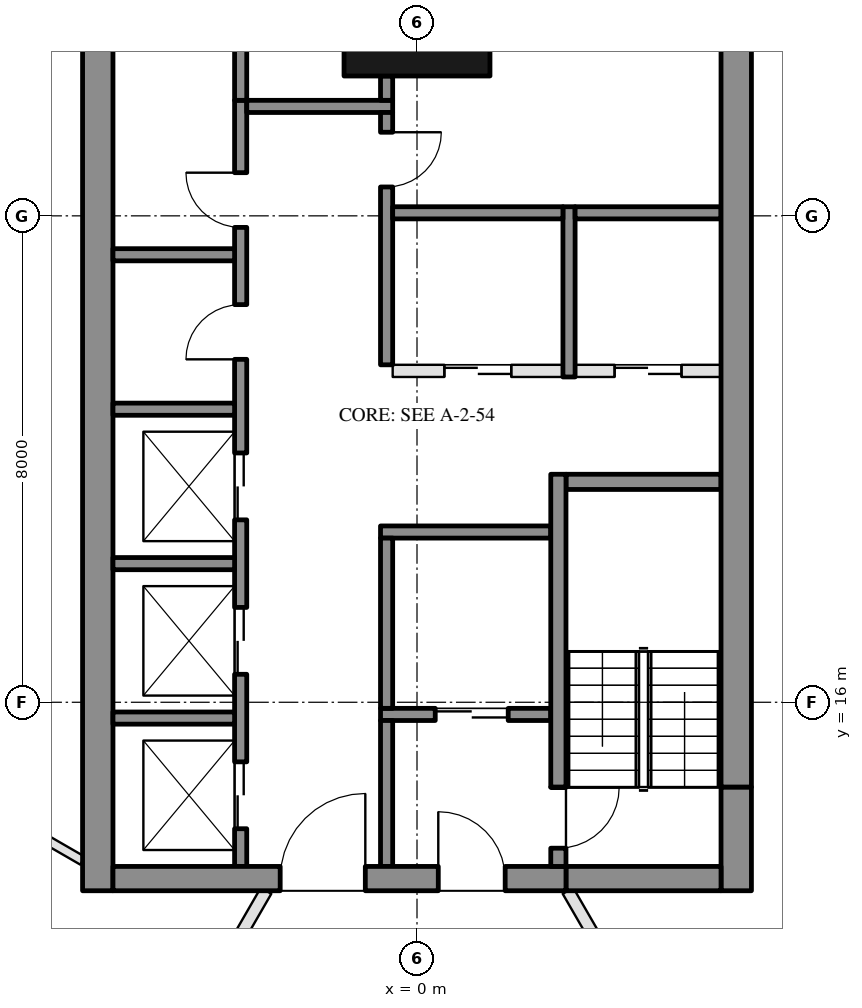
"""IFC4 building model, lengths in metres.
Left out: names, types, materials, properties, quantities, classifications, styles, units other than length and angle.
Written with IfcOpenShell. Run it as: python <this file> out.ifc"""

import sys

from ifc_helpers import new_model, si_unit, direction, frame, frame_2d, origin, origin_2d, place, context, subcontext, project, spatial, rectangle, hollow_rectangle, extrude, element, fill, save


model = new_model("IFC4")
c1 = context("Model", 3, precision=1e-05, world=origin(), true_north=direction((0.0, 1.0)))
c2 = subcontext(c1, "Body", "Model", "MODEL_VIEW")
j1 = project(units=[si_unit("LENGTHUNIT", "METRE"), si_unit("PLANEANGLEUNIT", "RADIAN")], contexts=[c1])
p1 = place(None, origin())
s1 = spatial("IfcSite", under=j1, at=p1, CompositionType="ELEMENT")
p2 = place(p1, origin())
s2 = spatial("IfcBuilding", under=s1, at=p2, CompositionType="ELEMENT")
p3 = place(p2, frame((0.0, 0.0, 231.7)))
s3 = spatial("IfcBuildingStorey", under=s2, at=p3, CompositionType="ELEMENT", Elevation=231.7)
p4 = place(p3, frame((0.0, 27.4, 0.0), z_axis=(0.0, 0.0, 1.0), x_axis=(1.0, 0.0, 0.0)))
e1 = element("IfcColumn", 1, at=p4, inside=s3, PredefinedType="COLUMN", context=c2, shape_type="SweptSolid", body=[
    extrude(hollow_rectangle(XDim=2.4, YDim=2.2, WallThickness=0.06, at=origin_2d()), origin(), (0.0, 0.0, 1.0), 6.0),
])
p5 = place(p3, frame((-5.25, 12.9, 0.0), z_axis=(0.0, 0.0, 1.0), x_axis=(0.0, 1.0, 0.0)))
e2 = element("IfcWall", 2, at=p5, inside=s3, PredefinedType="SHEAR", context=c2, shape_type="SweptSolid", body=[
    extrude(rectangle(XDim=14.837, YDim=0.5, at=frame_2d((7.418, 0.0))), origin(), (0.0, 0.0, 1.0), 5.7),
])
p6 = place(p3, frame((5.0, 19.625, 0.0), z_axis=(0.0, 0.0, 1.0), x_axis=(-1.0, 0.0, 0.0)))
e3 = element("IfcWall", 3, at=p6, inside=s3, PredefinedType="SHEAR", context=c2, shape_type="SweptSolid", body=[
    extrude(rectangle(XDim=2.55, YDim=0.25, at=frame_2d((1.275, 0.0))), origin(), (0.0, 0.0, 1.0), 5.7),
])
p7 = place(p3, frame((2.2, 18.8, 0.0), z_axis=(0.0, 0.0, 1.0), x_axis=(-1.0, 0.0, 0.0)))
e4 = element("IfcWall", 4, at=p7, inside=s3, PredefinedType="SHEAR", context=c2, shape_type="SweptSolid", body=[
    extrude(rectangle(XDim=2.8, YDim=0.2, at=frame_2d((1.4, 0.0))), origin(), (0.0, 0.0, 1.0), 5.7),
])
p8 = place(p3, frame((2.2, 15.8, 0.0), z_axis=(0.0, 0.0, 1.0), x_axis=(-1.0, 0.0, 0.0)))
e5 = element("IfcWall", 5, at=p8, inside=s3, PredefinedType="SHEAR", context=c2, shape_type="SweptSolid", body=[
    extrude(rectangle(XDim=2.8, YDim=0.2, at=frame_2d((1.4, 0.0))), origin(), (0.0, 0.0, 1.0), 5.7),
])
p9 = place(p8, frame((0.7, 0.0, 0.0)))
e6 = element("IfcOpeningElement", 6, at=p9, cuts=e5, PredefinedType="OPENING", context=c2, shape_type="SweptSolid", body=[
    extrude(rectangle(XDim=1.2, YDim=2.1, at=frame_2d((0.6, 1.05))), frame((0.0, 0.11, 0.0), z_axis=(0.0, -1.0, 0.0), x_axis=(1.0, 0.0, 0.0)), (0.0, 0.0, 1.0), 0.22),
])
p10 = place(p3, frame((-0.5, 15.9, 0.0), z_axis=(0.0, 0.0, 1.0), x_axis=(0.0, 1.0, 0.0)))
e7 = element("IfcWall", 7, at=p10, inside=s3, PredefinedType="SHEAR", context=c2, shape_type="SweptSolid", body=[
    extrude(rectangle(XDim=2.8, YDim=0.2, at=frame_2d((1.4, 0.0))), origin(), (0.0, 0.0, 1.0), 5.7),
])
p11 = place(p3, frame((-0.5, 13.3, 0.0), z_axis=(0.0, 0.0, 1.0), x_axis=(0.0, 1.0, 0.0)))
e8 = element("IfcWall", 8, at=p11, inside=s3, PredefinedType="SHEAR", context=c2, shape_type="SweptSolid", body=[
    extrude(rectangle(XDim=2.4, YDim=0.2, at=frame_2d((1.2, 0.0))), origin(), (0.0, 0.0, 1.0), 5.7),
])
p12 = place(p3, frame((-2.9, 13.3, 0.0), z_axis=(0.0, 0.0, 1.0), x_axis=(0.0, 1.0, 0.0)))
e9 = element("IfcWall", 9, at=p12, inside=s3, PredefinedType="SHEAR", context=c2, shape_type="SweptSolid", body=[
    extrude(rectangle(XDim=12.6, YDim=0.2, at=frame_2d((6.3, 0.0))), origin(), (0.0, 0.0, 1.0), 5.7),
])
p13 = place(p12, frame((0.62, 0.0, 0.0)))
e10 = element("IfcOpeningElement", 10, at=p13, cuts=e9, PredefinedType="OPENING", context=c2, shape_type="SweptSolid", body=[
    extrude(rectangle(XDim=1.1, YDim=2.1, at=frame_2d((0.55, 1.05))), frame((0.0, 0.11, 0.0), z_axis=(0.0, -1.0, 0.0), x_axis=(1.0, 0.0, 0.0)), (0.0, 0.0, 1.0), 0.22),
])
p14 = place(p12, frame((3.16, 0.0, 0.0)))
e11 = element("IfcOpeningElement", 11, at=p14, cuts=e9, PredefinedType="OPENING", context=c2, shape_type="SweptSolid", body=[
    extrude(rectangle(XDim=1.1, YDim=2.1, at=frame_2d((0.55, 1.05))), frame((0.0, 0.11, 0.0), z_axis=(0.0, -1.0, 0.0), x_axis=(1.0, 0.0, 0.0)), (0.0, 0.0, 1.0), 0.22),
])
p15 = place(p12, frame((5.7, 0.0, 0.0)))
e12 = element("IfcOpeningElement", 12, at=p15, cuts=e9, PredefinedType="OPENING", context=c2, shape_type="SweptSolid", body=[
    extrude(rectangle(XDim=1.1, YDim=2.1, at=frame_2d((0.55, 1.05))), frame((0.0, 0.11, 0.0), z_axis=(0.0, -1.0, 0.0), x_axis=(1.0, 0.0, 0.0)), (0.0, 0.0, 1.0), 0.22),
])
p16 = place(p12, frame((8.34, 0.0, 0.0)))
e13 = element("IfcOpeningElement", 13, at=p16, cuts=e9, PredefinedType="OPENING", context=c2, shape_type="SweptSolid", body=[
    extrude(rectangle(XDim=0.9, YDim=2.1, at=frame_2d((0.45, 1.05))), frame((0.0, 0.11, 0.0), z_axis=(0.0, -1.0, 0.0), x_axis=(1.0, 0.0, 0.0)), (0.0, 0.0, 1.0), 0.22),
])
p17 = place(p12, frame((10.51, 0.0, 0.0)))
e14 = element("IfcOpeningElement", 14, at=p17, cuts=e9, PredefinedType="OPENING", context=c2, shape_type="SweptSolid", body=[
    extrude(rectangle(XDim=0.9, YDim=2.1, at=frame_2d((0.45, 1.05))), frame((0.0, 0.11, 0.0), z_axis=(0.0, -1.0, 0.0), x_axis=(1.0, 0.0, 0.0)), (0.0, 0.0, 1.0), 0.22),
])
p18 = place(p3, frame((-0.4, 25.8, 0.0), z_axis=(0.0, 0.0, 1.0), x_axis=(-1.0, 0.0, 0.0)))
e15 = element("IfcWall", 15, at=p18, inside=s3, PredefinedType="SHEAR", context=c2, shape_type="SweptSolid", body=[
    extrude(rectangle(XDim=2.4, YDim=0.2, at=frame_2d((1.2, 0.0))), origin(), (0.0, 0.0, 1.0), 5.7),
])
p19 = place(p3, frame((-0.5, 21.55, 0.0), z_axis=(0.0, 0.0, 1.0), x_axis=(0.0, 1.0, 0.0)))
e16 = element("IfcWall", 16, at=p19, inside=s3, PredefinedType="SHEAR", context=c2, shape_type="SweptSolid", body=[
    extrude(rectangle(XDim=4.15, YDim=0.2, at=frame_2d((2.075, 0.0))), origin(), (0.0, 0.0, 1.0), 5.7),
])
p20 = place(p19, frame((2.925, 0.0, 0.0)))
e17 = element("IfcOpeningElement", 17, at=p20, cuts=e16, PredefinedType="OPENING", context=c2, shape_type="SweptSolid", body=[
    extrude(rectangle(XDim=0.9, YDim=2.1, at=frame_2d((0.45, 1.05))), frame((0.0, 0.11, 0.0), z_axis=(0.0, -1.0, 0.0), x_axis=(1.0, 0.0, 0.0)), (0.0, 0.0, 1.0), 0.22),
])
for number, where, z_axis, x_axis in (
    (18, (-3.0, 15.74, 0.0), (0.0, 0.0, 1.0), (-1.0, 0.0, 0.0)),
    (19, (-3.0, 18.28, 0.0), (0.0, 0.0, 1.0), (-1.0, 0.0, 0.0)),
    (20, (-3.0, 20.82, 0.0), (0.0, 0.0, 1.0), (-1.0, 0.0, 0.0)),
    (21, (-3.0, 23.36, 0.0), (0.0, 0.0, 1.0), (-1.0, 0.0, 0.0)),
):
    element("IfcWall", number, at=place(p3, frame(where, z_axis=z_axis, x_axis=x_axis)), inside=s3, PredefinedType="SHEAR", context=c2, shape_type="SweptSolid", body=[
        extrude(rectangle(XDim=2.0, YDim=0.2, at=frame_2d((1.0, 0.0))), origin(), (0.0, 0.0, 1.0), 5.7),
    ])
p21 = place(p3, frame((-0.5, 25.9, 0.0), z_axis=(0.0, 0.0, 1.0), x_axis=(0.0, 1.0, 0.0)))
e22 = element("IfcWall", 22, at=p21, inside=s3, PredefinedType="SHEAR", context=c2, shape_type="SweptSolid", body=[
    extrude(rectangle(XDim=0.4, YDim=0.2, at=frame_2d((0.2, 0.0))), origin(), (0.0, 0.0, 1.0), 5.7),
])
p22 = place(p3, frame((-2.9, 25.9, 0.0), z_axis=(0.0, 0.0, 1.0), x_axis=(0.0, 1.0, 0.0)))
e23 = element("IfcWall", 23, at=p22, inside=s3, PredefinedType="SHEAR", context=c2, shape_type="SweptSolid", body=[
    extrude(rectangle(XDim=2.6, YDim=0.2, at=frame_2d((1.3, 0.0))), origin(), (0.0, 0.0, 1.0), 5.7),
])
p23 = place(p3, frame((2.5, 21.35, 0.0), z_axis=(0.0, 0.0, 1.0), x_axis=(0.0, 1.0, 0.0)))
e24 = element("IfcWall", 24, at=p23, inside=s3, PredefinedType="SHEAR", context=c2, shape_type="SweptSolid", body=[
    extrude(rectangle(XDim=2.8, YDim=0.2, at=frame_2d((1.4, 0.0))), origin(), (0.0, 0.0, 1.0), 5.7),
])
p24 = place(p3, frame((5.0, 24.05, 0.0), z_axis=(0.0, 0.0, 1.0), x_axis=(-1.0, 0.0, 0.0)))
e25 = element("IfcWall", 25, at=p24, inside=s3, PredefinedType="SHEAR", context=c2, shape_type="SweptSolid", body=[
    extrude(rectangle(XDim=2.4, YDim=0.2, at=frame_2d((1.2, 0.0))), origin(), (0.0, 0.0, 1.0), 5.7),
])
p25 = place(p3, frame((2.4, 24.05, 0.0), z_axis=(0.0, 0.0, 1.0), x_axis=(-1.0, 0.0, 0.0)))
e26 = element("IfcWall", 26, at=p25, inside=s3, PredefinedType="SHEAR", context=c2, shape_type="SweptSolid", body=[
    extrude(rectangle(XDim=2.8, YDim=0.2, at=frame_2d((1.4, 0.0))), origin(), (0.0, 0.0, 1.0), 5.7),
])
p26 = place(p3, frame((5.0, 21.45, 0.0), z_axis=(0.0, 0.0, 1.0), x_axis=(-1.0, 0.0, 0.0)))
e27 = element("IfcWall", 27, at=p26, inside=s3, PredefinedType="PARTITIONING", context=c2, shape_type="SweptSolid", body=[
    extrude(rectangle(XDim=2.4, YDim=0.2, at=frame_2d((1.2, 0.0))), origin(), (0.0, 0.0, 1.0), 5.7),
])
p27 = place(p26, frame((0.65, 0.0, 0.0)))
e28 = element("IfcOpeningElement", 28, at=p27, cuts=e27, PredefinedType="OPENING", context=c2, shape_type="SweptSolid", body=[
    extrude(rectangle(XDim=1.1, YDim=2.1, at=frame_2d((0.55, 1.05))), frame((0.0, 0.11, 0.0), z_axis=(0.0, -1.0, 0.0), x_axis=(1.0, 0.0, 0.0)), (0.0, 0.0, 1.0), 0.22),
])
p28 = place(p3, frame((2.4, 21.45, 0.0), z_axis=(0.0, 0.0, 1.0), x_axis=(-1.0, 0.0, 0.0)))
e29 = element("IfcWall", 29, at=p28, inside=s3, PredefinedType="PARTITIONING", context=c2, shape_type="SweptSolid", body=[
    extrude(rectangle(XDim=2.8, YDim=0.2, at=frame_2d((1.4, 0.0))), origin(), (0.0, 0.0, 1.0), 5.7),
])
p29 = place(p28, frame((0.85, 0.0, 0.0)))
e30 = element("IfcOpeningElement", 30, at=p29, cuts=e29, PredefinedType="OPENING", context=c2, shape_type="SweptSolid", body=[
    extrude(rectangle(XDim=1.1, YDim=2.1, at=frame_2d((0.55, 1.05))), frame((0.0, 0.11, 0.0), z_axis=(0.0, -1.0, 0.0), x_axis=(1.0, 0.0, 0.0)), (0.0, 0.0, 1.0), 0.22),
])
p30 = place(p3, frame((5.25, 12.9, 0.0), z_axis=(0.0, 0.0, 1.0), x_axis=(0.0, 1.0, 0.0)))
e31 = element("IfcWall", 31, at=p30, inside=s3, PredefinedType="SHEAR", context=c2, shape_type="SweptSolid", body=[
    extrude(rectangle(XDim=1.706, YDim=0.5, at=frame_2d((0.853, 0.0))), origin(), (0.0, 0.0, 1.0), 5.7),
])
p31 = place(p3, frame((5.25, 14.606, 0.0), z_axis=(0.0, 0.0, 1.0), x_axis=(0.0, 1.0, 0.0)))
e32 = element("IfcWall", 32, at=p31, inside=s3, PredefinedType="SHEAR", context=c2, shape_type="SweptSolid", body=[
    extrude(rectangle(XDim=13.131, YDim=0.5, at=frame_2d((6.565, 0.0))), origin(), (0.0, 0.0, 1.0), 5.7),
])
p32 = place(p3, frame((5.0, 13.1, 0.0), z_axis=(0.0, 0.0, 1.0), x_axis=(-1.0, 0.0, 0.0)))
e33 = element("IfcWall", 33, at=p32, inside=s3, PredefinedType="SHEAR", context=c2, shape_type="SweptSolid", body=[
    extrude(rectangle(XDim=2.55, YDim=0.4, at=frame_2d((1.275, 0.0))), origin(), (0.0, 0.0, 1.0), 5.7),
])
p33 = place(p3, frame((2.45, 13.1, 0.0), z_axis=(0.0, 0.0, 1.0), x_axis=(-1.0, 0.0, 0.0)))
e34 = element("IfcWall", 34, at=p33, inside=s3, PredefinedType="SHEAR", context=c2, shape_type="SweptSolid", body=[
    extrude(rectangle(XDim=7.45, YDim=0.4, at=frame_2d((3.725, 0.0))), origin(), (0.0, 0.0, 1.0), 5.7),
])
p34 = place(p33, frame((1.0, 0.0, 0.0)))
e35 = element("IfcOpeningElement", 35, at=p34, cuts=e34, PredefinedType="OPENING", context=c2, shape_type="SweptSolid", body=[
    extrude(rectangle(XDim=1.1, YDim=2.1, at=frame_2d((0.55, 1.05))), frame((0.0, 0.21, 0.0), z_axis=(0.0, -1.0, 0.0), x_axis=(1.0, 0.0, 0.0)), (0.0, 0.0, 1.0), 0.42),
])
p35 = place(p33, frame((3.3, 0.0, 0.0)))
e36 = element("IfcOpeningElement", 36, at=p35, cuts=e34, PredefinedType="OPENING", context=c2, shape_type="SweptSolid", body=[
    extrude(rectangle(XDim=1.4, YDim=2.1, at=frame_2d((0.7, 1.05))), frame((0.0, 0.21, 0.0), z_axis=(0.0, -1.0, 0.0), x_axis=(1.0, 0.0, 0.0)), (0.0, 0.0, 1.0), 0.42),
])
p36 = place(p3, frame((2.325, 13.3, 0.0), z_axis=(0.0, 0.0, 1.0), x_axis=(0.0, 1.0, 0.0)))
e37 = element("IfcWall", 37, at=p36, inside=s3, PredefinedType="SHEAR", context=c2, shape_type="SweptSolid", body=[
    extrude(rectangle(XDim=1.306, YDim=0.25, at=frame_2d((0.653, 0.0))), origin(), (0.0, 0.0, 1.0), 5.7),
])
p37 = place(p36, frame((0.3, 0.0, 0.0)))
e38 = element("IfcOpeningElement", 38, at=p37, cuts=e37, PredefinedType="OPENING", context=c2, shape_type="SweptSolid", body=[
    extrude(rectangle(XDim=1.0, YDim=2.1, at=frame_2d((0.5, 1.05))), frame((0.0, 0.135, 0.0), z_axis=(0.0, -1.0, 0.0), x_axis=(1.0, 0.0, 0.0)), (0.0, 0.0, 1.0), 0.27),
])
p38 = place(p3, frame((2.325, 14.606, 0.0), z_axis=(0.0, 0.0, 1.0), x_axis=(0.0, 1.0, 0.0)))
e39 = element("IfcWall", 39, at=p38, inside=s3, PredefinedType="SHEAR", context=c2, shape_type="SweptSolid", body=[
    extrude(rectangle(XDim=5.144, YDim=0.25, at=frame_2d((2.572, 0.0))), origin(), (0.0, 0.0, 1.0), 5.7),
])
p39 = place(p3, frame((12.413, -4.3, 0.0), z_axis=(0.0, 0.0, 1.0), x_axis=(-0.50000478328, 0.866022642139, 0.0)))
e40 = element("IfcWall", 40, at=p39, inside=s3, PredefinedType="PARTITIONING", context=c2, shape_type="SweptSolid", body=[
    extrude(rectangle(XDim=19.861, YDim=0.2, at=frame_2d((9.931, 0.0))), origin(), (0.0, 0.0, 1.0), 4.91),
])
p40 = place(p39, frame((1.142, 0.0, 0.0)))
e41 = element("IfcOpeningElement", 41, at=p40, cuts=e40, PredefinedType="OPENING", context=c2, shape_type="SweptSolid", body=[
    extrude(rectangle(XDim=1.8, YDim=2.4, at=frame_2d((0.9, 1.2))), frame((0.0, 0.11, 0.0), z_axis=(0.0, -1.0, 0.0), x_axis=(1.0, 0.0, 0.0)), (0.0, 0.0, 1.0), 0.22),
])
p41 = place(p39, frame((4.325, 0.0, 0.0)))
e42 = element("IfcOpeningElement", 42, at=p41, cuts=e40, PredefinedType="OPENING", context=c2, shape_type="SweptSolid", body=[
    extrude(rectangle(XDim=1.8, YDim=2.4, at=frame_2d((0.9, 1.2))), frame((0.0, 0.11, 0.0), z_axis=(0.0, -1.0, 0.0), x_axis=(1.0, 0.0, 0.0)), (0.0, 0.0, 1.0), 0.22),
])
p42 = place(p39, frame((9.536, 0.0, 0.0)))
e43 = element("IfcOpeningElement", 43, at=p42, cuts=e40, PredefinedType="OPENING", context=c2, shape_type="SweptSolid", body=[
    extrude(rectangle(XDim=1.2, YDim=2.1, at=frame_2d((0.6, 1.05))), frame((0.0, 0.11, 0.0), z_axis=(0.0, -1.0, 0.0), x_axis=(1.0, 0.0, 0.0)), (0.0, 0.0, 1.0), 0.22),
])
p43 = place(p39, frame((16.019, 0.0, 0.0)))
e44 = element("IfcOpeningElement", 44, at=p43, cuts=e40, PredefinedType="OPENING", context=c2, shape_type="SweptSolid", body=[
    extrude(rectangle(XDim=1.2, YDim=2.1, at=frame_2d((0.6, 1.05))), frame((0.0, 0.11, 0.0), z_axis=(0.0, -1.0, 0.0), x_axis=(1.0, 0.0, 0.0)), (0.0, 0.0, 1.0), 0.22),
])
p44 = place(p3, frame((-12.402, 17.379, 0.0), z_axis=(0.0, 0.0, 1.0), x_axis=(0.866021319631, -0.500007073895, 0.0)))
e45 = element("IfcWall", 45, at=p44, inside=s3, PredefinedType="PARTITIONING", context=c2, shape_type="SweptSolid", body=[
    extrude(rectangle(XDim=7.97, YDim=0.15, at=frame_2d((3.985, 0.0))), origin(), (0.0, 0.0, 1.0), 5.7),
])
p45 = place(p44, frame((3.535, 0.0, 0.0)))
e46 = element("IfcOpeningElement", 46, at=p45, cuts=e45, PredefinedType="OPENING", context=c2, shape_type="SweptSolid", body=[
    extrude(rectangle(XDim=0.9, YDim=2.1, at=frame_2d((0.45, 1.05))), frame((0.0, 0.085, 0.0), z_axis=(0.0, -1.0, 0.0), x_axis=(1.0, 0.0, 0.0)), (0.0, 0.0, 1.0), 0.17),
])
p46 = place(p3, frame((-15.077, 12.746, 0.0), z_axis=(0.0, 0.0, 1.0), x_axis=(0.866026447599, -0.499998192055, 0.0)))
e47 = element("IfcWall", 47, at=p46, inside=s3, PredefinedType="PARTITIONING", context=c2, shape_type="SweptSolid", body=[
    extrude(rectangle(XDim=10.73, YDim=0.15, at=frame_2d((5.365, 0.0))), origin(), (0.0, 0.0, 1.0), 5.7),
])
p47 = place(p3, frame((-2.482, 12.9, 0.0), z_axis=(0.0, 0.0, 1.0), x_axis=(-0.50000478328, -0.866022642139, 0.0)))
e48 = element("IfcWall", 48, at=p47, inside=s3, PredefinedType="PARTITIONING", context=c2, shape_type="SweptSolid", body=[
    extrude(rectangle(XDim=19.861, YDim=0.2, at=frame_2d((9.931, 0.0))), origin(), (0.0, 0.0, 1.0), 4.91),
])
p48 = place(p47, frame((2.968, 0.0, 0.0)))
e49 = element("IfcOpeningElement", 49, at=p48, cuts=e48, PredefinedType="OPENING", context=c2, shape_type="SweptSolid", body=[
    extrude(rectangle(XDim=1.5, YDim=2.1, at=frame_2d((0.75, 1.05))), frame((0.0, 0.11, 0.0), z_axis=(0.0, -1.0, 0.0), x_axis=(1.0, 0.0, 0.0)), (0.0, 0.0, 1.0), 0.22),
])
p49 = place(p47, frame((15.968, 0.0, 0.0)))
e50 = element("IfcOpeningElement", 50, at=p49, cuts=e48, PredefinedType="OPENING", context=c2, shape_type="SweptSolid", body=[
    extrude(rectangle(XDim=1.0, YDim=2.1, at=frame_2d((0.5, 1.05))), frame((0.0, 0.11, 0.0), z_axis=(0.0, -1.0, 0.0), x_axis=(1.0, 0.0, 0.0)), (0.0, 0.0, 1.0), 0.22),
])
p50 = place(p47, frame((9.43, 0.0, 0.0)))
e51 = element("IfcOpeningElement", 51, at=p50, cuts=e48, PredefinedType="OPENING", context=c2, shape_type="SweptSolid", body=[
    extrude(rectangle(XDim=1.0, YDim=2.1, at=frame_2d((0.5, 1.05))), frame((0.0, 0.11, 0.0), z_axis=(0.0, -1.0, 0.0), x_axis=(1.0, 0.0, 0.0)), (0.0, 0.0, 1.0), 0.22),
])
p51 = place(p9, origin())
e52 = element("IfcDoor", 52, at=p51, inside=s3, OperationType="DOUBLE_DOOR_SLIDING", PredefinedType="DOOR", context=c2, shape_type="SweptSolid", body=[
    extrude(rectangle(XDim=1.2, YDim=2.1, at=frame_2d((0.6, 1.05))), frame((0.0, 0.025, 0.0), z_axis=(0.0, -1.0, 0.0), x_axis=(1.0, 0.0, 0.0)), (0.0, 0.0, 1.0), 0.05),
])
fill(e6, e52)
p52 = place(p13, origin())
e53 = element("IfcDoor", 53, at=p52, inside=s3, OperationType="DOUBLE_DOOR_SLIDING", PredefinedType="DOOR", context=c2, shape_type="SweptSolid", body=[
    extrude(rectangle(XDim=1.1, YDim=2.1, at=frame_2d((0.55, 1.05))), frame((0.0, 0.025, 0.0), z_axis=(0.0, -1.0, 0.0), x_axis=(1.0, 0.0, 0.0)), (0.0, 0.0, 1.0), 0.05),
])
fill(e10, e53)
p53 = place(p14, origin())
e54 = element("IfcDoor", 54, at=p53, inside=s3, OperationType="DOUBLE_DOOR_SLIDING", PredefinedType="DOOR", context=c2, shape_type="SweptSolid", body=[
    extrude(rectangle(XDim=1.1, YDim=2.1, at=frame_2d((0.55, 1.05))), frame((0.0, 0.025, 0.0), z_axis=(0.0, -1.0, 0.0), x_axis=(1.0, 0.0, 0.0)), (0.0, 0.0, 1.0), 0.05),
])
fill(e11, e54)
p54 = place(p15, origin())
e55 = element("IfcDoor", 55, at=p54, inside=s3, OperationType="DOUBLE_DOOR_SLIDING", PredefinedType="DOOR", context=c2, shape_type="SweptSolid", body=[
    extrude(rectangle(XDim=1.1, YDim=2.1, at=frame_2d((0.55, 1.05))), frame((0.0, 0.025, 0.0), z_axis=(0.0, -1.0, 0.0), x_axis=(1.0, 0.0, 0.0)), (0.0, 0.0, 1.0), 0.05),
])
fill(e12, e55)
p55 = place(p16, origin())
e56 = element("IfcDoor", 56, at=p55, inside=s3, OperationType="SINGLE_SWING_LEFT", PredefinedType="DOOR", context=c2, shape_type="SweptSolid", body=[
    extrude(rectangle(XDim=0.9, YDim=2.1, at=frame_2d((0.45, 1.05))), frame((0.0, 0.025, 0.0), z_axis=(0.0, -1.0, 0.0), x_axis=(1.0, 0.0, 0.0)), (0.0, 0.0, 1.0), 0.05),
])
fill(e13, e56)
p56 = place(p17, origin())
e57 = element("IfcDoor", 57, at=p56, inside=s3, OperationType="SINGLE_SWING_RIGHT", PredefinedType="DOOR", context=c2, shape_type="SweptSolid", body=[
    extrude(rectangle(XDim=0.9, YDim=2.1, at=frame_2d((0.45, 1.05))), frame((0.0, 0.025, 0.0), z_axis=(0.0, -1.0, 0.0), x_axis=(1.0, 0.0, 0.0)), (0.0, 0.0, 1.0), 0.05),
])
fill(e14, e57)
p57 = place(p27, origin())
e58 = element("IfcDoor", 58, at=p57, inside=s3, OperationType="DOUBLE_DOOR_SLIDING", PredefinedType="DOOR", context=c2, shape_type="SweptSolid", body=[
    extrude(rectangle(XDim=1.1, YDim=2.1, at=frame_2d((0.55, 1.05))), frame((0.0, 0.025, 0.0), z_axis=(0.0, -1.0, 0.0), x_axis=(1.0, 0.0, 0.0)), (0.0, 0.0, 1.0), 0.05),
])
fill(e28, e58)
p58 = place(p29, origin())
e59 = element("IfcDoor", 59, at=p58, inside=s3, OperationType="DOUBLE_DOOR_SLIDING", PredefinedType="DOOR", context=c2, shape_type="SweptSolid", body=[
    extrude(rectangle(XDim=1.1, YDim=2.1, at=frame_2d((0.55, 1.05))), frame((0.0, 0.025, 0.0), z_axis=(0.0, -1.0, 0.0), x_axis=(1.0, 0.0, 0.0)), (0.0, 0.0, 1.0), 0.05),
])
fill(e30, e59)
p59 = place(p20, frame((0.9, 0.0, 0.0), z_axis=(0.0, 0.0, 1.0), x_axis=(-1.0, 0.0, 0.0)))
e60 = element("IfcDoor", 60, at=p59, inside=s3, OperationType="SINGLE_SWING_LEFT", PredefinedType="DOOR", context=c2, shape_type="SweptSolid", body=[
    extrude(rectangle(XDim=0.9, YDim=2.1, at=frame_2d((0.45, 1.05))), frame((0.0, 0.025, 0.0), z_axis=(0.0, -1.0, 0.0), x_axis=(1.0, 0.0, 0.0)), (0.0, 0.0, 1.0), 0.05),
])
fill(e17, e60)
p60 = place(p34, frame((1.1, 0.0, 0.0), z_axis=(0.0, 0.0, 1.0), x_axis=(-1.0, 0.0, 0.0)))
e61 = element("IfcDoor", 61, at=p60, inside=s3, OperationType="SINGLE_SWING_LEFT", PredefinedType="DOOR", context=c2, shape_type="SweptSolid", body=[
    extrude(rectangle(XDim=1.1, YDim=2.1, at=frame_2d((0.55, 1.05))), frame((0.0, 0.025, 0.0), z_axis=(0.0, -1.0, 0.0), x_axis=(1.0, 0.0, 0.0)), (0.0, 0.0, 1.0), 0.05),
])
fill(e35, e61)
p61 = place(p35, frame((1.4, 0.0, 0.0), z_axis=(0.0, 0.0, 1.0), x_axis=(-1.0, 0.0, 0.0)))
e62 = element("IfcDoor", 62, at=p61, inside=s3, OperationType="DOUBLE_DOOR_SINGLE_SWING", PredefinedType="DOOR", context=c2, shape_type="SweptSolid", body=[
    extrude(rectangle(XDim=1.4, YDim=2.1, at=frame_2d((0.7, 1.05))), frame((0.0, 0.025, 0.0), z_axis=(0.0, -1.0, 0.0), x_axis=(1.0, 0.0, 0.0)), (0.0, 0.0, 1.0), 0.05),
])
fill(e36, e62)
p62 = place(p37, frame((1.0, 0.0, 0.0), z_axis=(0.0, 0.0, 1.0), x_axis=(-1.0, 0.0, 0.0)))
e63 = element("IfcDoor", 63, at=p62, inside=s3, OperationType="SINGLE_SWING_LEFT", PredefinedType="DOOR", context=c2, shape_type="SweptSolid", body=[
    extrude(rectangle(XDim=1.0, YDim=2.1, at=frame_2d((0.5, 1.05))), frame((0.0, 0.025, 0.0), z_axis=(0.0, -1.0, 0.0), x_axis=(1.0, 0.0, 0.0)), (0.0, 0.0, 1.0), 0.05),
])
fill(e38, e63)
save(model, sys.argv[1])
